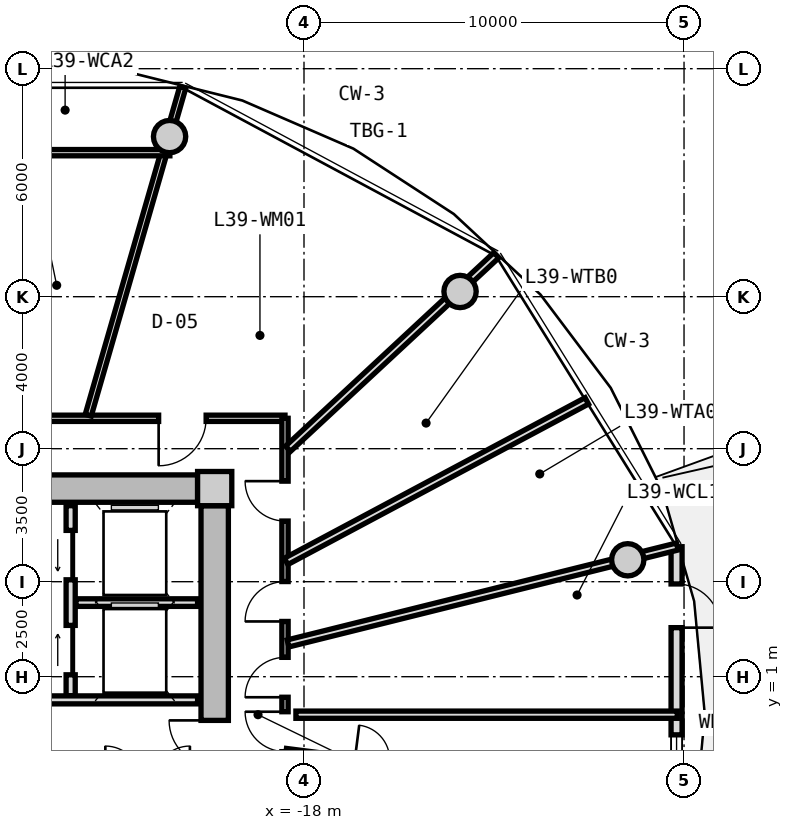
"""IFC4 building model, lengths in metres.
Left out: names, types, materials, properties, quantities, classifications, styles, units other than length and angle.
Written with IfcOpenShell. Run it as: python <this file> out.ifc"""

import sys

from ifc_helpers import new_model, si_unit, direction, frame, frame_2d, origin, origin_2d, place, context, subcontext, project, spatial, rectangle, circle, extrude, source, transform, mapped, element, fill, save


model = new_model("IFC4")
c1 = context("Model", 3, precision=1e-05, world=origin(), true_north=direction((0.0, 1.0)))
c2 = subcontext(c1, "Body", "Model", "MODEL_VIEW")
j1 = project(units=[si_unit("LENGTHUNIT", "METRE"), si_unit("PLANEANGLEUNIT", "RADIAN")], contexts=[c1])
p1 = place(None, origin())
s1 = spatial("IfcSite", under=j1, at=p1, CompositionType="ELEMENT")
p2 = place(p1, origin())
s2 = spatial("IfcBuilding", under=s1, at=p2, CompositionType="ELEMENT")
p3 = place(p2, frame((0.0, 0.0, 126.75)))
s3 = spatial("IfcBuildingStorey", under=s2, at=p3, CompositionType="ELEMENT", Elevation=126.75)
m1 = source(origin(), c2, "Body", "SweptSolid", [
    extrude(rectangle(XDim=0.9, YDim=0.9, at=origin_2d()), origin(), (0.0, 0.0, 1.0), 3.05),
])
p4 = place(p3, frame((-20.35, 5.95, 0.0), z_axis=(0.0, 0.0, 1.0), x_axis=(1.0, 0.0, 0.0)))
e1 = element("IfcColumn", 1, at=p4, inside=s3, PredefinedType="COLUMN", context=c2, shape_type="MappedRepresentation", body=[
    mapped(m1, transform((0.0, 0.0, 0.0), x_axis=(1.0, 0.0, 0.0), y_axis=(0.0, 1.0, 0.0), z_axis=(0.0, 0.0, 1.0), scale=1.0)),
])
m2 = source(origin(), c2, "Body", "SweptSolid", [
    extrude(rectangle(XDim=14.4, YDim=0.72, at=frame_2d((7.2, 0.0))), origin(), (0.0, 0.0, 1.0), 2.73),
])
p5 = place(p3, frame((-35.2, 5.95, 0.0), z_axis=(0.0, 0.0, 1.0), x_axis=(1.0, 0.0, 0.0)))
e2 = element("IfcWall", 2, at=p5, inside=s3, PredefinedType="SHEAR", context=c2, shape_type="MappedRepresentation", body=[
    mapped(m2, transform((0.0, 0.0, 0.0), x_axis=(1.0, 0.0, 0.0), y_axis=(0.0, 1.0, 0.0), z_axis=(0.0, 0.0, 1.0), scale=1.0)),
])
m3 = source(origin(), c2, "Body", "SweptSolid", [
    extrude(rectangle(XDim=11.0, YDim=0.72, at=frame_2d((5.5, 0.0))), origin(), (0.0, 0.0, 1.0), 2.73),
])
p6 = place(p3, frame((-20.35, 5.5, 0.0), z_axis=(0.0, 0.0, 1.0), x_axis=(0.0, -1.0, 0.0)))
e3 = element("IfcWall", 3, at=p6, inside=s3, PredefinedType="SHEAR", context=c2, shape_type="MappedRepresentation", body=[
    mapped(m3, transform((0.0, 0.0, 0.0), x_axis=(1.0, 0.0, 0.0), y_axis=(0.0, 1.0, 0.0), z_axis=(0.0, 0.0, 1.0), scale=1.0)),
])
p7 = place(p6, frame((5.65, 0.0, 0.0)))
e4 = element("IfcOpeningElement", 4, at=p7, cuts=e3, PredefinedType="OPENING", context=c2, shape_type="SweptSolid", body=[
    extrude(rectangle(XDim=1.2, YDim=2.15, at=frame_2d((0.6, 1.075))), frame((0.0, 0.37, 0.0), z_axis=(0.0, -1.0, 0.0), x_axis=(1.0, 0.0, 0.0)), (0.0, 0.0, 1.0), 0.74),
])
m4 = source(origin(), c2, "Body", "SweptSolid", [
    extrude(circle(Radius=0.425, at=origin_2d()), origin(), (0.0, 0.0, 1.0), 3.05),
])
for number, where, z_axis, x_axis in (
    (5, (-9.481, 4.076, 0.0), (0.0, 0.0, 1.0), (1.0, 0.0, 0.0)),
    (6, (-13.894, 11.137, 0.0), (0.0, 0.0, 1.0), (1.0, 0.0, 0.0)),
    (7, (-21.537, 15.213, 0.0), (0.0, 0.0, 1.0), (1.0, 0.0, 0.0)),
):
    element("IfcColumn", number, at=place(p3, frame(where, z_axis=z_axis, x_axis=x_axis)), inside=s3, PredefinedType="COLUMN", context=c2, shape_type="MappedRepresentation", body=[
        mapped(m4, transform((0.0, 0.0, 0.0), x_axis=(1.0, 0.0, 0.0), y_axis=(0.0, 1.0, 0.0), z_axis=(0.0, 0.0, 1.0), scale=1.0)),
    ])
m5 = source(origin(), c2, "Body", "SweptSolid", [
    extrude(rectangle(XDim=8.841, YDim=0.29, at=frame_2d((4.421, 0.0))), origin(), (0.0, 0.0, 1.0), 2.73),
])
p8 = place(p3, frame((-8.196, 4.421, 0.0), z_axis=(0.0, 0.0, 1.0), x_axis=(0.0, -1.0, 0.0)))
e8 = element("IfcWall", 8, at=p8, inside=s3, PredefinedType="SOLIDWALL", context=c2, shape_type="MappedRepresentation", body=[
    mapped(m5, transform((0.0, 0.0, 0.0), x_axis=(1.0, 0.0, 0.0), y_axis=(0.0, 1.0, 0.0), z_axis=(0.0, 0.0, 1.0), scale=1.0)),
])
p9 = place(p8, frame((0.98, 0.0, 0.0)))
e9 = element("IfcOpeningElement", 9, at=p9, cuts=e8, PredefinedType="OPENING", context=c2, shape_type="SweptSolid", body=[
    extrude(rectangle(XDim=1.15, YDim=2.25, at=frame_2d((0.575, 1.125))), frame((0.0, 0.155, 0.0), z_axis=(0.0, -1.0, 0.0), x_axis=(1.0, 0.0, 0.0)), (0.0, 0.0, 1.0), 0.31),
])
p10 = place(p8, frame((4.951, 0.0, 0.85)))
e10 = element("IfcOpeningElement", 10, at=p10, cuts=e8, PredefinedType="OPENING", context=c2, shape_type="SweptSolid", body=[
    extrude(rectangle(XDim=1.2, YDim=1.5, at=frame_2d((0.6, 0.75))), frame((0.0, 0.155, 0.0), z_axis=(0.0, -1.0, 0.0), x_axis=(1.0, 0.0, 0.0)), (0.0, 0.0, 1.0), 0.31),
])
m6 = source(origin(), c2, "Body", "SweptSolid", [
    extrude(rectangle(XDim=5.0, YDim=0.24, at=frame_2d((2.5, 0.0))), origin(), (0.0, 0.0, 1.0), 2.715),
])
p11 = place(p3, frame((-24.14, 0.5, 0.0), z_axis=(0.0, 0.0, 1.0), x_axis=(0.0, 1.0, 0.0)))
e11 = element("IfcWall", 11, at=p11, inside=s3, PredefinedType="PARTITIONING", context=c2, shape_type="MappedRepresentation", body=[
    mapped(m6, transform((0.0, 0.0, 0.0), x_axis=(1.0, 0.0, 0.0), y_axis=(0.0, 1.0, 0.0), z_axis=(0.0, 0.0, 1.0), scale=1.0)),
])
p12 = place(p11, frame((3.05, 0.0, 0.0)))
e12 = element("IfcOpeningElement", 12, at=p12, cuts=e11, PredefinedType="OPENING", context=c2, shape_type="SweptSolid", body=[
    extrude(rectangle(XDim=1.3, YDim=2.2, at=frame_2d((0.65, 1.1))), frame((0.0, 0.13, 0.0), z_axis=(0.0, -1.0, 0.0), x_axis=(1.0, 0.0, 0.0)), (0.0, 0.0, 1.0), 0.26),
])
p13 = place(p11, frame((0.55, 0.0, 0.0)))
e13 = element("IfcOpeningElement", 13, at=p13, cuts=e11, PredefinedType="OPENING", context=c2, shape_type="SweptSolid", body=[
    extrude(rectangle(XDim=1.3, YDim=2.2, at=frame_2d((0.65, 1.1))), frame((0.0, 0.13, 0.0), z_axis=(0.0, -1.0, 0.0), x_axis=(1.0, 0.0, 0.0)), (0.0, 0.0, 1.0), 0.26),
])
m7 = source(origin(), c2, "Body", "SweptSolid", [
    extrude(rectangle(XDim=3.2, YDim=0.2, at=frame_2d((1.6, 0.0))), origin(), (0.0, 0.0, 1.0), 2.715),
])
p14 = place(p3, frame((-24.0, 2.95, 0.0), z_axis=(0.0, 0.0, 1.0), x_axis=(1.0, 0.0, 0.0)))
e14 = element("IfcWall", 14, at=p14, inside=s3, PredefinedType="PARTITIONING", context=c2, shape_type="MappedRepresentation", body=[
    mapped(m7, transform((0.0, 0.0, 0.0), x_axis=(1.0, 0.0, 0.0), y_axis=(0.0, 1.0, 0.0), z_axis=(0.0, 0.0, 1.0), scale=1.0)),
])
m8 = source(origin(), c2, "Body", "SweptSolid", [
    extrude(rectangle(XDim=6.66, YDim=0.21, at=frame_2d((3.33, 0.0))), origin(), (0.0, 0.0, 1.0), 2.715),
])
p15 = place(p3, frame((-27.46, 0.39, 0.0), z_axis=(0.0, 0.0, 1.0), x_axis=(1.0, 0.0, 0.0)))
e15 = element("IfcWall", 15, at=p15, inside=s3, PredefinedType="PARTITIONING", context=c2, shape_type="MappedRepresentation", body=[
    mapped(m8, transform((0.0, 0.0, 0.0), x_axis=(1.0, 0.0, 0.0), y_axis=(0.0, 1.0, 0.0), z_axis=(0.0, 0.0, 1.0), scale=1.0)),
])
p16 = place(p15, frame((1.0, 0.0, 0.0)))
e16 = element("IfcOpeningElement", 16, at=p16, cuts=e15, PredefinedType="OPENING", context=c2, shape_type="SweptSolid", body=[
    extrude(rectangle(XDim=1.2, YDim=2.15, at=frame_2d((0.6, 1.075))), frame((0.0, 0.115, 0.0), z_axis=(0.0, -1.0, 0.0), x_axis=(1.0, 0.0, 0.0)), (0.0, 0.0, 1.0), 0.23),
])
m9 = source(origin(), c2, "Body", "SweptSolid", [
    extrude(rectangle(XDim=8.6, YDim=0.165, at=frame_2d((4.3, 0.0))), origin(), (0.0, 0.0, 1.0), 2.715),
])
p17 = place(p3, frame((-27.1, 7.8, 0.0), z_axis=(0.0, 0.0, 1.0), x_axis=(1.0, 0.0, 0.0)))
e17 = element("IfcWall", 17, at=p17, inside=s3, PredefinedType="PARTITIONING", context=c2, shape_type="MappedRepresentation", body=[
    mapped(m9, transform((0.0, 0.0, 0.0), x_axis=(1.0, 0.0, 0.0), y_axis=(0.0, 1.0, 0.0), z_axis=(0.0, 0.0, 1.0), scale=1.0)),
])
p18 = place(p17, frame((5.275, 0.0, 0.0)))
e18 = element("IfcOpeningElement", 18, at=p18, cuts=e17, PredefinedType="OPENING", context=c2, shape_type="SweptSolid", body=[
    extrude(rectangle(XDim=1.25, YDim=2.2, at=frame_2d((0.625, 1.1))), frame((0.0, 0.093, 0.0), z_axis=(0.0, -1.0, 0.0), x_axis=(1.0, 0.0, 0.0)), (0.0, 0.0, 1.0), 0.185),
])
m10 = source(origin(), c2, "Body", "SweptSolid", [
    extrude(rectangle(XDim=15.6, YDim=0.165, at=frame_2d((7.8, 0.0))), origin(), (0.0, 0.0, 1.0), 2.715),
])
p19 = place(p3, frame((-18.5, 7.8, 0.0), z_axis=(0.0, 0.0, 1.0), x_axis=(0.0, -1.0, 0.0)))
e19 = element("IfcWall", 19, at=p19, inside=s3, PredefinedType="PARTITIONING", context=c2, shape_type="MappedRepresentation", body=[
    mapped(m10, transform((0.0, 0.0, 0.0), x_axis=(1.0, 0.0, 0.0), y_axis=(0.0, 1.0, 0.0), z_axis=(0.0, 0.0, 1.0), scale=1.0)),
])
p20 = place(p19, frame((12.002, 0.0, 0.0)))
e20 = element("IfcOpeningElement", 20, at=p20, cuts=e19, PredefinedType="OPENING", context=c2, shape_type="SweptSolid", body=[
    extrude(rectangle(XDim=1.05, YDim=2.15, at=frame_2d((0.525, 1.075))), frame((0.0, 0.093, 0.0), z_axis=(0.0, -1.0, 0.0), x_axis=(1.0, 0.0, 0.0)), (0.0, 0.0, 1.0), 0.185),
])
p21 = place(p19, frame((10.211, 0.0, 0.0)))
e21 = element("IfcOpeningElement", 21, at=p21, cuts=e19, PredefinedType="OPENING", context=c2, shape_type="SweptSolid", body=[
    extrude(rectangle(XDim=1.05, YDim=2.15, at=frame_2d((0.525, 1.075))), frame((0.0, 0.093, 0.0), z_axis=(0.0, -1.0, 0.0), x_axis=(1.0, 0.0, 0.0)), (0.0, 0.0, 1.0), 0.185),
])
p22 = place(p19, frame((7.722, 0.0, 0.0)))
e22 = element("IfcOpeningElement", 22, at=p22, cuts=e19, PredefinedType="OPENING", context=c2, shape_type="SweptSolid", body=[
    extrude(rectangle(XDim=1.05, YDim=2.15, at=frame_2d((0.525, 1.075))), frame((0.0, 0.093, 0.0), z_axis=(0.0, -1.0, 0.0), x_axis=(1.0, 0.0, 0.0)), (0.0, 0.0, 1.0), 0.185),
])
p23 = place(p19, frame((6.291, 0.0, 0.0)))
e23 = element("IfcOpeningElement", 23, at=p23, cuts=e19, PredefinedType="OPENING", context=c2, shape_type="SweptSolid", body=[
    extrude(rectangle(XDim=1.05, YDim=2.15, at=frame_2d((0.525, 1.075))), frame((0.0, 0.093, 0.0), z_axis=(0.0, -1.0, 0.0), x_axis=(1.0, 0.0, 0.0)), (0.0, 0.0, 1.0), 0.185),
])
p24 = place(p19, frame((4.296, 0.0, 0.0)))
e24 = element("IfcOpeningElement", 24, at=p24, cuts=e19, PredefinedType="OPENING", context=c2, shape_type="SweptSolid", body=[
    extrude(rectangle(XDim=1.05, YDim=2.15, at=frame_2d((0.525, 1.075))), frame((0.0, 0.093, 0.0), z_axis=(0.0, -1.0, 0.0), x_axis=(1.0, 0.0, 0.0)), (0.0, 0.0, 1.0), 0.185),
])
p25 = place(p19, frame((1.654, 0.0, 0.0)))
e25 = element("IfcOpeningElement", 25, at=p25, cuts=e19, PredefinedType="OPENING", context=c2, shape_type="SweptSolid", body=[
    extrude(rectangle(XDim=1.05, YDim=2.15, at=frame_2d((0.525, 1.075))), frame((0.0, 0.093, 0.0), z_axis=(0.0, -1.0, 0.0), x_axis=(1.0, 0.0, 0.0)), (0.0, 0.0, 1.0), 0.185),
])
m11 = source(origin(), c2, "Body", "SweptSolid", [
    extrude(rectangle(XDim=8.989, YDim=0.165, at=frame_2d((4.495, 0.0))), origin(), (0.0, 0.0, 1.0), 2.215),
])
p26 = place(p3, frame((-23.678, 7.88, 0.0), z_axis=(0.0, 0.0, 1.0), x_axis=(0.27702323008, 0.960863221274, 0.0)))
e26 = element("IfcWall", 26, at=p26, inside=s3, PredefinedType="PARTITIONING", context=c2, shape_type="MappedRepresentation", body=[
    mapped(m11, transform((0.0, 0.0, 0.0), x_axis=(1.0, 0.0, 0.0), y_axis=(0.0, 1.0, 0.0), z_axis=(0.0, 0.0, 1.0), scale=1.0)),
])
m12 = source(origin(), c2, "Body", "SweptSolid", [
    extrude(rectangle(XDim=4.851, YDim=0.165, at=frame_2d((2.425, 0.0))), origin(), (0.0, 0.0, 1.0), 2.715),
])
p27 = place(p3, frame((-26.38, 14.79, 0.0), z_axis=(0.0, 0.0, 1.0), x_axis=(1.0, 0.0, 0.0)))
e27 = element("IfcWall", 27, at=p27, inside=s3, PredefinedType="PARTITIONING", context=c2, shape_type="MappedRepresentation", body=[
    mapped(m12, transform((0.0, 0.0, 0.0), x_axis=(1.0, 0.0, 0.0), y_axis=(0.0, 1.0, 0.0), z_axis=(0.0, 0.0, 1.0), scale=1.0)),
])
m13 = source(origin(), c2, "Body", "SweptSolid", [
    extrude(rectangle(XDim=10.556, YDim=0.19, at=frame_2d((5.278, 0.0))), origin(), (0.0, 0.0, 1.0), 2.215),
])
p28 = place(p3, frame((-18.42, 1.875, 0.0), z_axis=(0.0, 0.0, 1.0), x_axis=(0.970363857851, 0.241648470667, 0.0)))
e28 = element("IfcWall", 28, at=p28, inside=s3, PredefinedType="PARTITIONING", context=c2, shape_type="MappedRepresentation", body=[
    mapped(m13, transform((0.0, 0.0, 0.0), x_axis=(1.0, 0.0, 0.0), y_axis=(0.0, 1.0, 0.0), z_axis=(0.0, 0.0, 1.0), scale=1.0)),
])
m14 = source(origin(), c2, "Body", "SweptSolid", [
    extrude(rectangle(XDim=10.036, YDim=0.19, at=frame_2d((5.018, 0.0))), origin(), (0.0, 0.0, 1.0), 2.715),
])
p29 = place(p3, frame((-18.213, 0.0, 0.0), z_axis=(0.0, 0.0, 1.0), x_axis=(1.0, 0.0, 0.0)))
e29 = element("IfcWall", 29, at=p29, inside=s3, PredefinedType="PARTITIONING", context=c2, shape_type="MappedRepresentation", body=[
    mapped(m14, transform((0.0, 0.0, 0.0), x_axis=(1.0, 0.0, 0.0), y_axis=(0.0, 1.0, 0.0), z_axis=(0.0, 0.0, 1.0), scale=1.0)),
])
m15 = source(origin(), c2, "Body", "SweptSolid", [
    extrude(rectangle(XDim=4.562, YDim=0.14, at=frame_2d((2.281, 0.0))), origin(), (0.0, 0.0, 1.0), 2.715),
])
p30 = place(p3, frame((-18.47, -0.958, 0.0), z_axis=(0.0, 0.0, 1.0), x_axis=(0.991904666356, -0.126984774129, 0.0)))
e30 = element("IfcWall", 30, at=p30, inside=s3, PredefinedType="PARTITIONING", context=c2, shape_type="MappedRepresentation", body=[
    mapped(m15, transform((0.0, 0.0, 0.0), x_axis=(1.0, 0.0, 0.0), y_axis=(0.0, 1.0, 0.0), z_axis=(0.0, 0.0, 1.0), scale=1.0)),
])
p31 = place(p30, frame((1.821, 0.0, 0.0)))
e31 = element("IfcOpeningElement", 31, at=p31, cuts=e30, PredefinedType="OPENING", context=c2, shape_type="SweptSolid", body=[
    extrude(rectangle(XDim=0.92, YDim=2.1, at=frame_2d((0.46, 1.05))), frame((0.0, 0.08, 0.0), z_axis=(0.0, -1.0, 0.0), x_axis=(1.0, 0.0, 0.0)), (0.0, 0.0, 1.0), 0.16),
])
m16 = source(origin(), c2, "Body", "SweptSolid", [
    extrude(rectangle(XDim=7.482, YDim=0.19, at=frame_2d((3.741, 0.0))), origin(), (0.0, 0.0, 1.0), 2.215),
])
p32 = place(p3, frame((-18.42, 6.998, 0.0), z_axis=(0.0, 0.0, 1.0), x_axis=(0.732508698043, 0.680757671489, 0.0)))
e32 = element("IfcWall", 32, at=p32, inside=s3, PredefinedType="PARTITIONING", context=c2, shape_type="MappedRepresentation", body=[
    mapped(m16, transform((0.0, 0.0, 0.0), x_axis=(1.0, 0.0, 0.0), y_axis=(0.0, 1.0, 0.0), z_axis=(0.0, 0.0, 1.0), scale=1.0)),
])
m17 = source(origin(), c2, "Body", "SweptSolid", [
    extrude(rectangle(XDim=8.968, YDim=0.19, at=frame_2d((4.484, 0.0))), origin(), (0.0, 0.0, 1.0), 2.715),
])
p33 = place(p3, frame((-18.47, 4.036, 0.0), z_axis=(0.0, 0.0, 1.0), x_axis=(0.882202936563, 0.47086938605, 0.0)))
e33 = element("IfcWall", 33, at=p33, inside=s3, PredefinedType="PARTITIONING", context=c2, shape_type="MappedRepresentation", body=[
    mapped(m17, transform((0.0, 0.0, 0.0), x_axis=(1.0, 0.0, 0.0), y_axis=(0.0, 1.0, 0.0), z_axis=(0.0, 0.0, 1.0), scale=1.0)),
])
m18 = source(origin(), c2, "Body", "SweptSolid", [
    extrude(rectangle(XDim=1.15, YDim=2.25, at=frame_2d((0.575, 1.125))), frame((0.0, 0.025, 0.0), z_axis=(0.0, -1.0, 0.0), x_axis=(1.0, 0.0, 0.0)), (0.0, 0.0, 1.0), 0.05),
])
p34 = place(p9, origin())
e34 = element("IfcDoor", 34, at=p34, inside=s3, OperationType="SINGLE_SWING_RIGHT", PredefinedType="DOOR", context=c2, shape_type="MappedRepresentation", body=[
    mapped(m18, transform((0.0, 0.0, 0.0), x_axis=(1.0, 0.0, 0.0), y_axis=(0.0, 1.0, 0.0), z_axis=(0.0, 0.0, 1.0), scale=1.0)),
])
fill(e9, e34)
m19 = source(origin(), c2, "Body", "SweptSolid", [
    extrude(rectangle(XDim=1.2, YDim=1.5, at=frame_2d((0.6, 0.75))), frame((0.0, 0.03, 0.0), z_axis=(0.0, -1.0, 0.0), x_axis=(1.0, 0.0, 0.0)), (0.0, 0.0, 1.0), 0.06),
])
p35 = place(p10, origin())
e35 = element("IfcWindow", 35, at=p35, inside=s3, PartitioningType="SINGLE_PANEL", PredefinedType="WINDOW", context=c2, shape_type="MappedRepresentation", body=[
    mapped(m19, transform((0.0, 0.0, 0.0), x_axis=(1.0, 0.0, 0.0), y_axis=(0.0, 1.0, 0.0), z_axis=(0.0, 0.0, 1.0), scale=1.0)),
])
fill(e10, e35)
m20 = source(origin(), c2, "Body", "SweptSolid", [
    extrude(rectangle(XDim=1.3, YDim=2.2, at=frame_2d((0.65, 1.1))), frame((0.0, 0.025, 0.0), z_axis=(0.0, -1.0, 0.0), x_axis=(1.0, 0.0, 0.0)), (0.0, 0.0, 1.0), 0.05),
])
p36 = place(p12, origin())
e36 = element("IfcDoor", 36, at=p36, inside=s3, OperationType="SLIDING_TO_LEFT", PredefinedType="DOOR", context=c2, shape_type="MappedRepresentation", body=[
    mapped(m20, transform((0.0, 0.0, 0.0), x_axis=(1.0, 0.0, 0.0), y_axis=(0.0, 1.0, 0.0), z_axis=(0.0, 0.0, 1.0), scale=1.0)),
])
fill(e12, e36)
p37 = place(p13, origin())
e37 = element("IfcDoor", 37, at=p37, inside=s3, OperationType="SLIDING_TO_RIGHT", PredefinedType="DOOR", context=c2, shape_type="MappedRepresentation", body=[
    mapped(m20, transform((0.0, 0.0, 0.0), x_axis=(1.0, 0.0, 0.0), y_axis=(0.0, 1.0, 0.0), z_axis=(0.0, 0.0, 1.0), scale=1.0)),
])
fill(e13, e37)
m21 = source(origin(), c2, "Body", "SweptSolid", [
    extrude(rectangle(XDim=1.2, YDim=2.15, at=frame_2d((0.6, 1.075))), frame((0.0, 0.025, 0.0), z_axis=(0.0, -1.0, 0.0), x_axis=(1.0, 0.0, 0.0)), (0.0, 0.0, 1.0), 0.05),
])
p38 = place(p7, frame((1.2, 0.0, 0.0), z_axis=(0.0, 0.0, 1.0), x_axis=(-1.0, 0.0, 0.0)))
e38 = element("IfcDoor", 38, at=p38, inside=s3, OperationType="SINGLE_SWING_RIGHT", PredefinedType="DOOR", context=c2, shape_type="MappedRepresentation", body=[
    mapped(m21, transform((0.0, 0.0, 0.0), x_axis=(1.0, 0.0, 0.0), y_axis=(0.0, 1.0, 0.0), z_axis=(0.0, 0.0, 1.0), scale=1.0)),
])
fill(e4, e38)
m22 = source(origin(), c2, "Body", "SweptSolid", [
    extrude(rectangle(XDim=1.05, YDim=2.15, at=frame_2d((0.525, 1.075))), frame((0.0, 0.025, 0.0), z_axis=(0.0, -1.0, 0.0), x_axis=(1.0, 0.0, 0.0)), (0.0, 0.0, 1.0), 0.05),
])
p39 = place(p22, frame((1.05, 0.0, 0.0), z_axis=(0.0, 0.0, 1.0), x_axis=(-1.0, 0.0, 0.0)))
e39 = element("IfcDoor", 39, at=p39, inside=s3, OperationType="SINGLE_SWING_RIGHT", PredefinedType="DOOR", context=c2, shape_type="MappedRepresentation", body=[
    mapped(m22, transform((0.0, 0.0, 0.0), x_axis=(1.0, 0.0, 0.0), y_axis=(0.0, 1.0, 0.0), z_axis=(0.0, 0.0, 1.0), scale=1.0)),
])
fill(e22, e39)
p40 = place(p23, frame((1.05, 0.0, 0.0), z_axis=(0.0, 0.0, 1.0), x_axis=(-1.0, 0.0, 0.0)))
e40 = element("IfcDoor", 40, at=p40, inside=s3, OperationType="SINGLE_SWING_LEFT", PredefinedType="DOOR", context=c2, shape_type="MappedRepresentation", body=[
    mapped(m22, transform((0.0, 0.0, 0.0), x_axis=(1.0, 0.0, 0.0), y_axis=(0.0, 1.0, 0.0), z_axis=(0.0, 0.0, 1.0), scale=1.0)),
])
fill(e23, e40)
p41 = place(p24, frame((1.05, 0.0, 0.0), z_axis=(0.0, 0.0, 1.0), x_axis=(-1.0, 0.0, 0.0)))
e41 = element("IfcDoor", 41, at=p41, inside=s3, OperationType="SINGLE_SWING_LEFT", PredefinedType="DOOR", context=c2, shape_type="MappedRepresentation", body=[
    mapped(m22, transform((0.0, 0.0, 0.0), x_axis=(1.0, 0.0, 0.0), y_axis=(0.0, 1.0, 0.0), z_axis=(0.0, 0.0, 1.0), scale=1.0)),
])
fill(e24, e41)
p42 = place(p25, frame((1.05, 0.0, 0.0), z_axis=(0.0, 0.0, 1.0), x_axis=(-1.0, 0.0, 0.0)))
e42 = element("IfcDoor", 42, at=p42, inside=s3, OperationType="SINGLE_SWING_RIGHT", PredefinedType="DOOR", context=c2, shape_type="MappedRepresentation", body=[
    mapped(m22, transform((0.0, 0.0, 0.0), x_axis=(1.0, 0.0, 0.0), y_axis=(0.0, 1.0, 0.0), z_axis=(0.0, 0.0, 1.0), scale=1.0)),
])
fill(e25, e42)
m23 = source(origin(), c2, "Body", "SweptSolid", [
    extrude(rectangle(XDim=1.25, YDim=2.2, at=frame_2d((0.625, 1.1))), frame((0.0, 0.025, 0.0), z_axis=(0.0, -1.0, 0.0), x_axis=(1.0, 0.0, 0.0)), (0.0, 0.0, 1.0), 0.05),
])
p43 = place(p18, frame((1.25, 0.0, 0.0), z_axis=(0.0, 0.0, 1.0), x_axis=(-1.0, 0.0, 0.0)))
e43 = element("IfcDoor", 43, at=p43, inside=s3, OperationType="SINGLE_SWING_RIGHT", PredefinedType="DOOR", context=c2, shape_type="MappedRepresentation", body=[
    mapped(m23, transform((0.0, 0.0, 0.0), x_axis=(1.0, 0.0, 0.0), y_axis=(0.0, 1.0, 0.0), z_axis=(0.0, 0.0, 1.0), scale=1.0)),
])
fill(e18, e43)
save(model, sys.argv[1])
